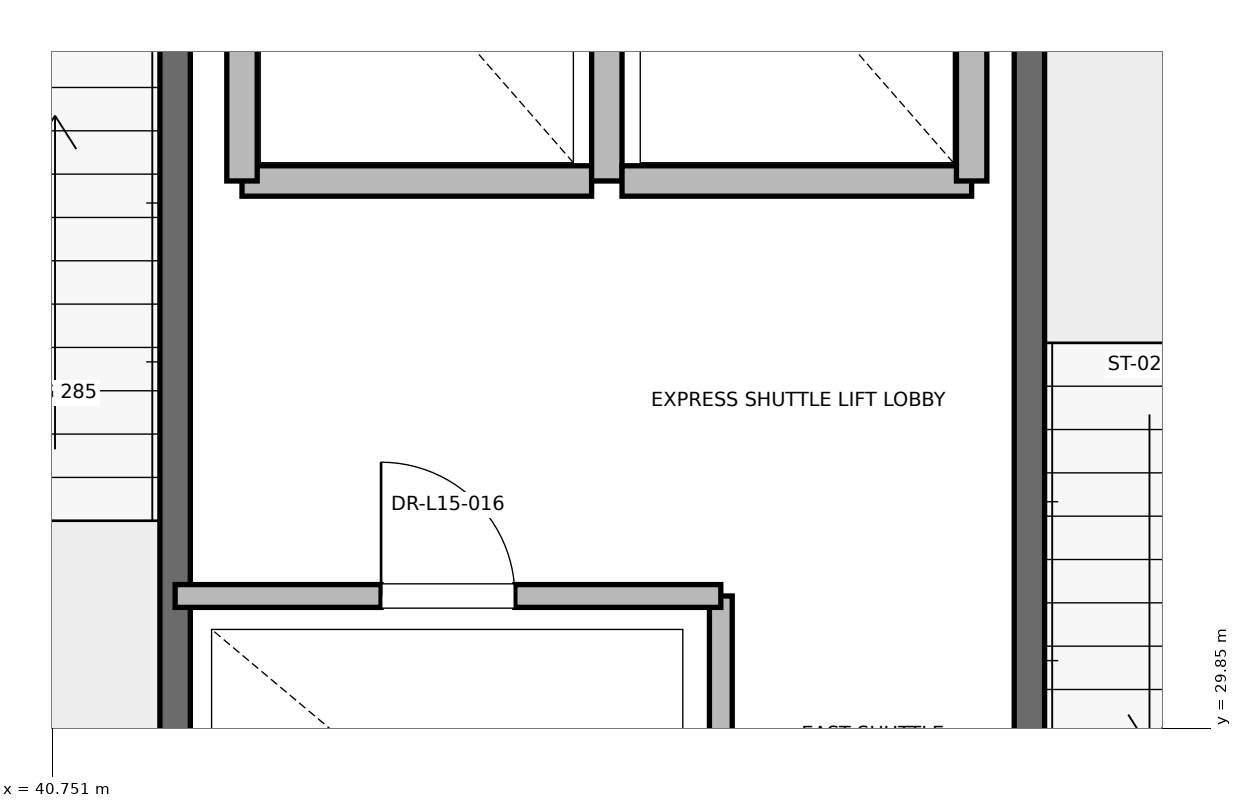
"""IFC4 building model, lengths in metres.
Left out: names, types, materials, properties, quantities, classifications, styles, units other than length and angle.
Written with IfcOpenShell. Run it as: python <this file> out.ifc"""

import sys

from ifc_helpers import new_model, si_unit, direction, frame, frame_2d, origin, place, context, subcontext, project, spatial, rectangle, extrude, element, fill, save


model = new_model("IFC4")
c1 = context("Model", 3, precision=1e-05, world=origin(), true_north=direction((0.0, 1.0)))
c2 = subcontext(c1, "Body", "Model", "MODEL_VIEW")
j1 = project(units=[si_unit("LENGTHUNIT", "METRE"), si_unit("PLANEANGLEUNIT", "RADIAN")], contexts=[c1])
p1 = place(None, origin())
s1 = spatial("IfcSite", under=j1, at=p1, CompositionType="ELEMENT")
p2 = place(p1, origin())
s2 = spatial("IfcBuilding", under=s1, at=p2, CompositionType="ELEMENT")
p3 = place(p2, frame((0.0, 0.0, 67.6)))
s3 = spatial("IfcBuildingStorey", under=s2, at=p3, CompositionType="ELEMENT", Elevation=67.6)
p4 = place(p3, frame((47.18, 27.62, 0.0), z_axis=(0.0, 0.0, 1.0), x_axis=(0.0, 1.0, 0.0)))
e1 = element("IfcWall", 1, at=p4, inside=s3, PredefinedType="SOLIDWALL", context=c2, shape_type="SweptSolid", body=[
    extrude(rectangle(XDim=8.18, YDim=0.2, at=frame_2d((4.09, 0.0))), origin(), (0.0, 0.0, 1.0), 3.76),
])
p5 = place(p3, frame((41.56, 27.68, 0.0), z_axis=(0.0, 0.0, 1.0), x_axis=(0.0, 1.0, 0.0)))
e2 = element("IfcWall", 2, at=p5, inside=s3, PredefinedType="SOLIDWALL", context=c2, shape_type="SweptSolid", body=[
    extrude(rectangle(XDim=8.57, YDim=0.2, at=frame_2d((4.285, 0.0))), origin(), (0.0, 0.0, 1.0), 3.76),
])
p6 = place(p3, frame((42.0, 33.45, 0.0), z_axis=(0.0, 0.0, 1.0), x_axis=(1.0, 0.0, 0.0)))
e3 = element("IfcWall", 3, at=p6, inside=s3, PredefinedType="SOLIDWALL", context=c2, shape_type="SweptSolid", body=[
    extrude(rectangle(XDim=2.3, YDim=0.2, at=frame_2d((1.15, 0.0))), origin(), (0.0, 0.0, 1.0), 3.76),
])
for number, where, z_axis, x_axis in (
    (4, (42.0, 36.05, 0.0), (0.0, 0.0, 1.0), (0.0, -1.0, 0.0)),
    (5, (44.4, 33.45, 0.0), (0.0, 0.0, 1.0), (0.0, 1.0, 0.0)),
):
    element("IfcWall", number, at=place(p3, frame(where, z_axis=z_axis, x_axis=x_axis)), inside=s3, PredefinedType="SOLIDWALL", context=c2, shape_type="SweptSolid", body=[
        extrude(rectangle(XDim=2.6, YDim=0.2, at=frame_2d((1.3, 0.0))), origin(), (0.0, 0.0, 1.0), 2.54),
    ])
p7 = place(p3, frame((44.5, 33.45, 0.0), z_axis=(0.0, 0.0, 1.0), x_axis=(1.0, 0.0, 0.0)))
e6 = element("IfcWall", 6, at=p7, inside=s3, PredefinedType="SOLIDWALL", context=c2, shape_type="SweptSolid", body=[
    extrude(rectangle(XDim=2.3, YDim=0.2, at=frame_2d((1.15, 0.0))), origin(), (0.0, 0.0, 1.0), 3.76),
])
p8 = place(p3, frame((46.8, 33.45, 0.0), z_axis=(0.0, 0.0, 1.0), x_axis=(0.0, 1.0, 0.0)))
e7 = element("IfcWall", 7, at=p8, inside=s3, PredefinedType="SOLIDWALL", context=c2, shape_type="SweptSolid", body=[
    extrude(rectangle(XDim=2.6, YDim=0.2, at=frame_2d((1.3, 0.0))), origin(), (0.0, 0.0, 1.0), 3.76),
])
p9 = place(p3, frame((45.15, 27.62, 0.0), z_axis=(0.0, 0.0, 1.0), x_axis=(0.0, 1.0, 0.0)))
e8 = element("IfcWall", 8, at=p9, inside=s3, PredefinedType="PARTITIONING", context=c2, shape_type="SweptSolid", body=[
    extrude(rectangle(XDim=3.1, YDim=0.15, at=frame_2d((1.55, 0.0))), origin(), (0.0, 0.0, 1.0), 2.85),
])
p10 = place(p3, frame((41.56, 30.72, 0.0), z_axis=(0.0, 0.0, 1.0), x_axis=(1.0, 0.0, 0.0)))
e9 = element("IfcWall", 9, at=p10, inside=s3, PredefinedType="PARTITIONING", context=c2, shape_type="SweptSolid", body=[
    extrude(rectangle(XDim=3.59, YDim=0.15, at=frame_2d((1.795, 0.0))), origin(), (0.0, 0.0, 1.0), 2.85),
])
p11 = place(p10, frame((1.355, 0.0, 0.0)))
e10 = element("IfcOpeningElement", 10, at=p11, cuts=e9, PredefinedType="OPENING", context=c2, shape_type="SweptSolid", body=[
    extrude(rectangle(XDim=0.88, YDim=2.1, at=frame_2d((0.44, 1.05))), frame((0.0, 0.075, 0.0), z_axis=(0.0, -1.0, 0.0), x_axis=(1.0, 0.0, 0.0)), (0.0, 0.0, 1.0), 0.15),
])
p12 = place(p11, origin())
e11 = element("IfcDoor", 11, at=p12, inside=s3, OperationType="SINGLE_SWING_LEFT", PredefinedType="DOOR", context=c2, shape_type="SweptSolid", body=[
    extrude(rectangle(XDim=0.88, YDim=2.1, at=frame_2d((0.44, 1.05))), frame((0.0, 0.025, 0.0), z_axis=(0.0, -1.0, 0.0), x_axis=(1.0, 0.0, 0.0)), (0.0, 0.0, 1.0), 0.05),
])
fill(e10, e11)
save(model, sys.argv[1])
